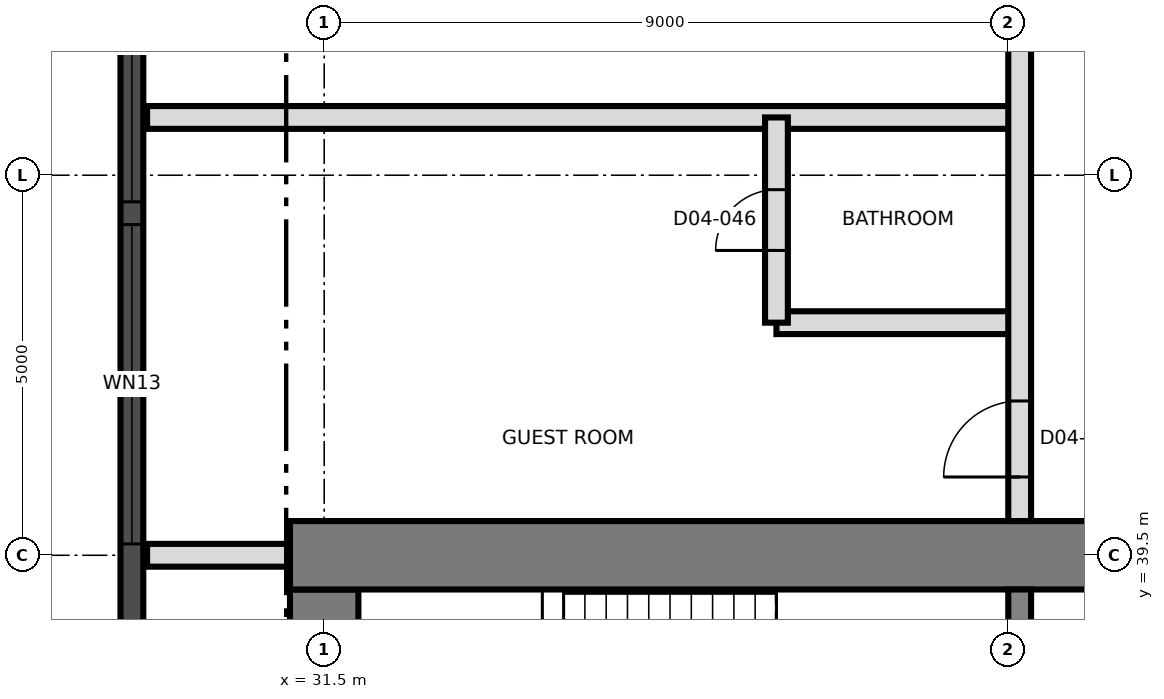
"""IFC4 building model, lengths in metres.
Left out: names, types, materials, properties, quantities, classifications, styles, units other than length and angle.
Written with IfcOpenShell. Run it as: python <this file> out.ifc"""

import sys

from ifc_helpers import new_model, si_unit, direction, frame, frame_2d, origin, place, context, subcontext, project, spatial, rectangle, extrude, element, fill, save


model = new_model("IFC4")
c1 = context("Model", 3, precision=1e-05, world=origin(), true_north=direction((0.0, 1.0)))
c2 = subcontext(c1, "Body", "Model", "MODEL_VIEW")
j1 = project(units=[si_unit("LENGTHUNIT", "METRE"), si_unit("PLANEANGLEUNIT", "RADIAN")], contexts=[c1])
p1 = place(None, origin())
s1 = spatial("IfcSite", under=j1, at=p1, CompositionType="ELEMENT")
p2 = place(p1, origin())
s2 = spatial("IfcBuilding", under=s1, at=p2, CompositionType="ELEMENT")
p3 = place(p2, frame((0.0, 0.0, 66.8)))
s3 = spatial("IfcBuildingStorey", under=s2, at=p3, CompositionType="ELEMENT", Elevation=66.8)
p4 = place(p3, frame((31.5, 21.95, 0.0), z_axis=(0.0, 0.0, 1.0), x_axis=(0.0, 1.0, 0.0)))
e1 = element("IfcWall", 1, at=p4, inside=s3, PredefinedType="SHEAR", context=c2, shape_type="SweptSolid", body=[
    extrude(rectangle(XDim=17.1, YDim=0.9, at=frame_2d((8.55, 0.0))), origin(), (0.0, 0.0, 1.0), 3.7),
])
p5 = place(p3, frame((31.05, 39.5, 0.0), z_axis=(0.0, 0.0, 1.0), x_axis=(1.0, 0.0, 0.0)))
e2 = element("IfcWall", 2, at=p5, inside=s3, PredefinedType="SHEAR", context=c2, shape_type="SweptSolid", body=[
    extrude(rectangle(XDim=27.0, YDim=0.9, at=frame_2d((13.5, 0.0))), origin(), (0.0, 0.0, 1.0), 3.7),
])
p6 = place(p5, frame((10.65, 0.0, 0.0)))
e3 = element("IfcOpeningElement", 3, at=p6, cuts=e2, PredefinedType="OPENING", context=c2, shape_type="SweptSolid", body=[
    extrude(rectangle(XDim=1.2, YDim=2.1, at=frame_2d((0.6, 1.05))), frame((0.0, 0.46, 0.0), z_axis=(0.0, -1.0, 0.0), x_axis=(1.0, 0.0, 0.0)), (0.0, 0.0, 1.0), 0.92),
])
p7 = place(p3, frame((40.65, 33.5, 0.0), z_axis=(0.0, 0.0, 1.0), x_axis=(0.0, 1.0, 0.0)))
e4 = element("IfcWall", 4, at=p7, inside=s3, PredefinedType="SHEAR", context=c2, shape_type="SweptSolid", body=[
    extrude(rectangle(XDim=5.55, YDim=0.3, at=frame_2d((2.775, 0.0))), origin(), (0.0, 0.0, 1.0), 3.7),
])
p8 = place(p3, frame((28.97, 66.986, 0.0), z_axis=(0.0, 0.0, 1.0), x_axis=(0.0, -1.0, 0.0)))
e5 = element("IfcWall", 5, at=p8, inside=s3, PredefinedType="SOLIDWALL", context=c2, shape_type="SweptSolid", body=[
    extrude(rectangle(XDim=32.976, YDim=0.3, at=frame_2d((16.488, 0.0))), origin(), (0.0, 0.0, 1.0), 3.4),
])
p9 = place(p8, frame((1.593, 0.0, 0.3)))
e6 = element("IfcOpeningElement", 6, at=p9, cuts=e5, PredefinedType="OPENING", context=c2, shape_type="SweptSolid", body=[
    extrude(rectangle(XDim=1.8, YDim=2.4, at=frame_2d((0.9, 1.2))), frame((0.0, 0.16, 0.0), z_axis=(0.0, -1.0, 0.0), x_axis=(1.0, 0.0, 0.0)), (0.0, 0.0, 1.0), 0.32),
])
p10 = place(p8, frame((5.136, 0.0, 0.9)))
e7 = element("IfcOpeningElement", 7, at=p10, cuts=e5, PredefinedType="OPENING", context=c2, shape_type="SweptSolid", body=[
    extrude(rectangle(XDim=4.2, YDim=1.7, at=frame_2d((2.1, 0.85))), frame((0.0, 0.16, 0.0), z_axis=(0.0, -1.0, 0.0), x_axis=(1.0, 0.0, 0.0)), (0.0, 0.0, 1.0), 0.32),
])
p11 = place(p8, frame((9.636, 0.0, 0.9)))
e8 = element("IfcOpeningElement", 8, at=p11, cuts=e5, PredefinedType="OPENING", context=c2, shape_type="SweptSolid", body=[
    extrude(rectangle(XDim=4.2, YDim=1.7, at=frame_2d((2.1, 0.85))), frame((0.0, 0.16, 0.0), z_axis=(0.0, -1.0, 0.0), x_axis=(1.0, 0.0, 0.0)), (0.0, 0.0, 1.0), 0.32),
])
p12 = place(p8, frame((14.136, 0.0, 0.9)))
e9 = element("IfcOpeningElement", 9, at=p12, cuts=e5, PredefinedType="OPENING", context=c2, shape_type="SweptSolid", body=[
    extrude(rectangle(XDim=4.2, YDim=1.7, at=frame_2d((2.1, 0.85))), frame((0.0, 0.16, 0.0), z_axis=(0.0, -1.0, 0.0), x_axis=(1.0, 0.0, 0.0)), (0.0, 0.0, 1.0), 0.32),
])
p13 = place(p8, frame((18.636, 0.0, 0.9)))
e10 = element("IfcOpeningElement", 10, at=p13, cuts=e5, PredefinedType="OPENING", context=c2, shape_type="SweptSolid", body=[
    extrude(rectangle(XDim=4.2, YDim=1.7, at=frame_2d((2.1, 0.85))), frame((0.0, 0.16, 0.0), z_axis=(0.0, -1.0, 0.0), x_axis=(1.0, 0.0, 0.0)), (0.0, 0.0, 1.0), 0.32),
])
p14 = place(p8, frame((23.136, 0.0, 0.9)))
e11 = element("IfcOpeningElement", 11, at=p14, cuts=e5, PredefinedType="OPENING", context=c2, shape_type="SweptSolid", body=[
    extrude(rectangle(XDim=4.2, YDim=1.7, at=frame_2d((2.1, 0.85))), frame((0.0, 0.16, 0.0), z_axis=(0.0, -1.0, 0.0), x_axis=(1.0, 0.0, 0.0)), (0.0, 0.0, 1.0), 0.32),
])
p15 = place(p8, frame((29.331, 0.0, 0.3)))
e12 = element("IfcOpeningElement", 12, at=p15, cuts=e5, PredefinedType="OPENING", context=c2, shape_type="SweptSolid", body=[
    extrude(rectangle(XDim=1.8, YDim=2.4, at=frame_2d((0.9, 1.2))), frame((0.0, 0.16, 0.0), z_axis=(0.0, -1.0, 0.0), x_axis=(1.0, 0.0, 0.0)), (0.0, 0.0, 1.0), 0.32),
])
p16 = place(p3, frame((29.17, 39.5, 0.0), z_axis=(0.0, 0.0, 1.0), x_axis=(1.0, 0.0, 0.0)))
e13 = element("IfcWall", 13, at=p16, inside=s3, PredefinedType="PARTITIONING", context=c2, shape_type="SweptSolid", body=[
    extrude(rectangle(XDim=1.86, YDim=0.3, at=frame_2d((0.93, 0.0))), origin(), (0.0, 0.0, 1.0), 3.35),
])
p17 = place(p3, frame((37.45, 42.56, 0.0), z_axis=(0.0, 0.0, 1.0), x_axis=(1.0, 0.0, 0.0)))
e14 = element("IfcWall", 14, at=p17, inside=s3, PredefinedType="PARTITIONING", context=c2, shape_type="SweptSolid", body=[
    extrude(rectangle(XDim=3.2, YDim=0.3, at=frame_2d((1.6, 0.0))), origin(), (0.0, 0.0, 1.0), 3.4),
])
p18 = place(p3, frame((29.17, 45.26, 0.0), z_axis=(0.0, 0.0, 1.0), x_axis=(1.0, 0.0, 0.0)))
e15 = element("IfcWall", 15, at=p18, inside=s3, PredefinedType="PARTITIONING", context=c2, shape_type="SweptSolid", body=[
    extrude(rectangle(XDim=11.48, YDim=0.3, at=frame_2d((5.74, 0.0))), origin(), (0.0, 0.0, 1.0), 3.35),
])
p19 = place(p3, frame((37.45, 42.56, 0.0), z_axis=(0.0, 0.0, 1.0), x_axis=(0.0, 1.0, 0.0)))
e16 = element("IfcWall", 16, at=p19, inside=s3, PredefinedType="PARTITIONING", context=c2, shape_type="SweptSolid", body=[
    extrude(rectangle(XDim=2.7, YDim=0.3, at=frame_2d((1.35, 0.0))), origin(), (0.0, 0.0, 1.0), 3.4),
])
p20 = place(p19, frame((0.95, 0.0, 0.0)))
e17 = element("IfcOpeningElement", 17, at=p20, cuts=e16, PredefinedType="OPENING", context=c2, shape_type="SweptSolid", body=[
    extrude(rectangle(XDim=0.8, YDim=2.1, at=frame_2d((0.4, 1.05))), frame((0.0, 0.16, 0.0), z_axis=(0.0, -1.0, 0.0), x_axis=(1.0, 0.0, 0.0)), (0.0, 0.0, 1.0), 0.32),
])
p21 = place(p3, frame((40.65, 39.95, 0.0), z_axis=(0.0, 0.0, 1.0), x_axis=(0.0, 1.0, 0.0)))
e18 = element("IfcWall", 18, at=p21, inside=s3, PredefinedType="PARTITIONING", context=c2, shape_type="SweptSolid", body=[
    extrude(rectangle(XDim=37.05, YDim=0.3, at=frame_2d((18.525, 0.0))), origin(), (0.0, 0.0, 1.0), 3.35),
])
p22 = place(p21, frame((0.58, 0.0, 0.0)))
e19 = element("IfcOpeningElement", 19, at=p22, cuts=e18, PredefinedType="OPENING", context=c2, shape_type="SweptSolid", body=[
    extrude(rectangle(XDim=1.0, YDim=2.1, at=frame_2d((0.5, 1.05))), frame((0.0, 0.16, 0.0), z_axis=(0.0, -1.0, 0.0), x_axis=(1.0, 0.0, 0.0)), (0.0, 0.0, 1.0), 0.32),
])
p23 = place(p21, frame((6.43, 0.0, 0.0)))
e20 = element("IfcOpeningElement", 20, at=p23, cuts=e18, PredefinedType="OPENING", context=c2, shape_type="SweptSolid", body=[
    extrude(rectangle(XDim=1.0, YDim=2.1, at=frame_2d((0.5, 1.05))), frame((0.0, 0.16, 0.0), z_axis=(0.0, -1.0, 0.0), x_axis=(1.0, 0.0, 0.0)), (0.0, 0.0, 1.0), 0.32),
])
p24 = place(p21, frame((14.2, 0.0, 0.0)))
e21 = element("IfcOpeningElement", 21, at=p24, cuts=e18, PredefinedType="OPENING", context=c2, shape_type="SweptSolid", body=[
    extrude(rectangle(XDim=1.0, YDim=2.4, at=frame_2d((0.5, 1.2))), frame((0.0, 0.16, 0.0), z_axis=(0.0, -1.0, 0.0), x_axis=(1.0, 0.0, 0.0)), (0.0, 0.0, 1.0), 0.32),
])
p25 = place(p21, frame((21.05, 0.0, 0.0)))
e22 = element("IfcOpeningElement", 22, at=p25, cuts=e18, PredefinedType="OPENING", context=c2, shape_type="SweptSolid", body=[
    extrude(rectangle(XDim=1.0, YDim=2.4, at=frame_2d((0.5, 1.2))), frame((0.0, 0.16, 0.0), z_axis=(0.0, -1.0, 0.0), x_axis=(1.0, 0.0, 0.0)), (0.0, 0.0, 1.0), 0.32),
])
p26 = place(p13, origin())
e23 = element("IfcWindow", 23, at=p26, inside=s3, PartitioningType="SINGLE_PANEL", PredefinedType="WINDOW", context=c2, shape_type="SweptSolid", body=[
    extrude(rectangle(XDim=4.2, YDim=1.7, at=frame_2d((2.1, 0.85))), frame((0.0, 0.03, 0.0), z_axis=(0.0, -1.0, 0.0), x_axis=(1.0, 0.0, 0.0)), (0.0, 0.0, 1.0), 0.06),
])
fill(e10, e23)
p27 = place(p14, origin())
e24 = element("IfcWindow", 24, at=p27, inside=s3, PartitioningType="SINGLE_PANEL", PredefinedType="WINDOW", context=c2, shape_type="SweptSolid", body=[
    extrude(rectangle(XDim=4.2, YDim=1.7, at=frame_2d((2.1, 0.85))), frame((0.0, 0.03, 0.0), z_axis=(0.0, -1.0, 0.0), x_axis=(1.0, 0.0, 0.0)), (0.0, 0.0, 1.0), 0.06),
])
fill(e11, e24)
p28 = place(p20, origin())
e25 = element("IfcDoor", 25, at=p28, inside=s3, OperationType="SINGLE_SWING_LEFT", PredefinedType="DOOR", context=c2, shape_type="SweptSolid", body=[
    extrude(rectangle(XDim=0.8, YDim=2.1, at=frame_2d((0.4, 1.05))), frame((0.0, 0.025, 0.0), z_axis=(0.0, -1.0, 0.0), x_axis=(1.0, 0.0, 0.0)), (0.0, 0.0, 1.0), 0.05),
])
fill(e17, e25)
p29 = place(p22, origin())
e26 = element("IfcDoor", 26, at=p29, inside=s3, OperationType="SINGLE_SWING_RIGHT", PredefinedType="DOOR", context=c2, shape_type="SweptSolid", body=[
    extrude(rectangle(XDim=1.0, YDim=2.1, at=frame_2d((0.5, 1.05))), frame((0.0, 0.025, 0.0), z_axis=(0.0, -1.0, 0.0), x_axis=(1.0, 0.0, 0.0)), (0.0, 0.0, 1.0), 0.05),
])
fill(e19, e26)
save(model, sys.argv[1])
